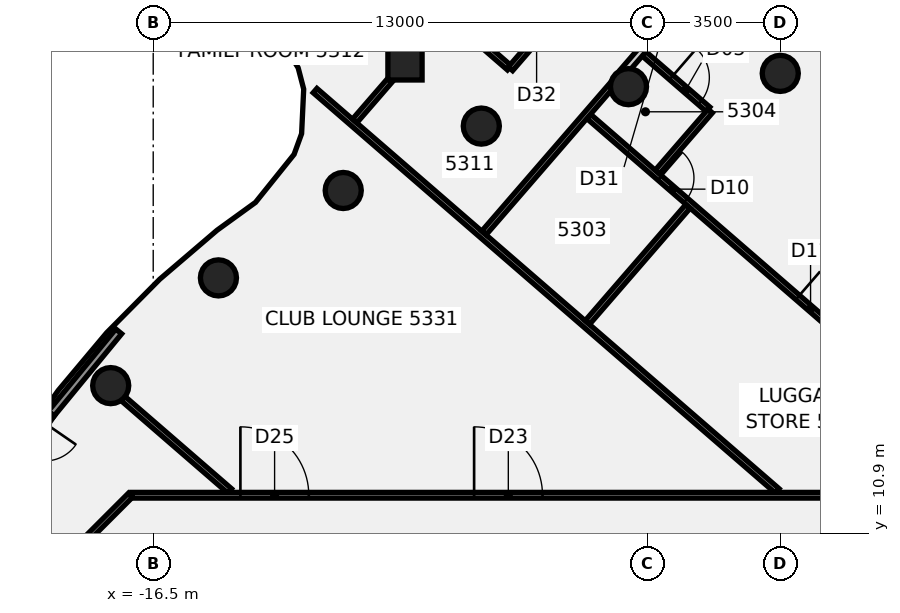
"""IFC4 building model, lengths in metres.
Left out: names, types, materials, properties, quantities, classifications, styles, units other than length and angle.
Written with IfcOpenShell. Run it as: python <this file> out.ifc"""

import sys

from ifc_helpers import new_model, si_unit, direction, frame, frame_2d, origin, origin_2d, place, context, subcontext, project, spatial, rectangle, circle, extrude, element, fill, save


model = new_model("IFC4")
c1 = context("Model", 3, precision=1e-05, world=origin(), true_north=direction((0.0, 1.0)))
c2 = subcontext(c1, "Body", "Model", "MODEL_VIEW")
j1 = project(units=[si_unit("LENGTHUNIT", "METRE"), si_unit("PLANEANGLEUNIT", "RADIAN")], contexts=[c1])
p1 = place(None, origin())
s1 = spatial("IfcSite", under=j1, at=p1, CompositionType="ELEMENT")
p2 = place(p1, origin())
s2 = spatial("IfcBuilding", under=s1, at=p2, CompositionType="ELEMENT")
p3 = place(p2, frame((0.0, 0.0, 211.3)))
s3 = spatial("IfcBuildingStorey", under=s2, at=p3, CompositionType="ELEMENT", Elevation=211.3)
for number, where, z_axis, x_axis in (
    (1, (0.0, 23.0, -0.14), (0.0, 0.0, 1.0), (1.0, 0.0, 0.0)),
    (2, (-3.994, 22.651, -0.14), (0.0, 0.0, 1.0), (1.0, 0.0, 0.0)),
    (3, (-7.866, 21.613, -0.14), (0.0, 0.0, 1.0), (1.0, 0.0, 0.0)),
    (4, (-11.5, 19.919, -0.14), (0.0, 0.0, 1.0), (1.0, 0.0, 0.0)),
    (5, (-14.784, 17.619, -0.14), (0.0, 0.0, 1.0), (1.0, 0.0, 0.0)),
    (6, (-17.619, 14.784, -0.14), (0.0, 0.0, 1.0), (1.0, 0.0, 0.0)),
):
    element("IfcColumn", number, at=place(p3, frame(where, z_axis=z_axis, x_axis=x_axis)), inside=s3, PredefinedType="COLUMN", context=c2, shape_type="SweptSolid", body=[
        extrude(circle(Radius=0.475, at=origin_2d()), origin(), (0.0, 0.0, 1.0), 3.56),
    ])
p4 = place(p3, frame((-9.875, 23.276, -0.139), z_axis=(-0.006107636485, -0.050576720108, 0.998701503033), x_axis=(0.65512033416, 0.754344619796, 0.042208320932)))
e7 = element("IfcColumn", 7, at=p4, inside=s3, PredefinedType="COLUMN", context=c2, shape_type="SweptSolid", body=[
    extrude(rectangle(XDim=0.9, YDim=0.9, at=origin_2d()), origin(), (0.0, 0.0, 1.0), 3.558),
])
p5 = place(p3, frame((-17.295, 14.446, 0.0), z_axis=(0.0, 0.0, 1.0), x_axis=(0.755890810331, -0.654697703415, 0.0)))
e8 = element("IfcWall", 8, at=p5, inside=s3, PredefinedType="PARTITIONING", context=c2, shape_type="SweptSolid", body=[
    extrude(rectangle(XDim=3.713, YDim=0.15, at=frame_2d((1.856, 0.0))), origin(), (0.0, 0.0, 1.0), 2.824),
])
p6 = place(p3, frame((-12.241, 22.547, 0.0), z_axis=(0.0, 0.0, 1.0), x_axis=(0.7559218532, -0.6546618607, 0.0)))
e9 = element("IfcWall", 9, at=p6, inside=s3, PredefinedType="PARTITIONING", context=c2, shape_type="SweptSolid", body=[
    extrude(rectangle(XDim=16.089, YDim=0.15, at=frame_2d((8.044, 0.0))), origin(), (0.0, 0.0, 1.0), 2.824),
])
p7 = place(p3, frame((-10.4, 29.421, 0.0), z_axis=(0.0, 0.0, 1.0), x_axis=(0.755729912983, -0.654883423689, 0.0)))
e10 = element("IfcWall", 10, at=p7, inside=s3, PredefinedType="PARTITIONING", context=c2, shape_type="SweptSolid", body=[
    extrude(rectangle(XDim=11.245, YDim=0.15, at=frame_2d((5.623, 0.0))), origin(), (0.0, 0.0, 1.0), 2.72),
])
p8 = place(p7, frame((9.97, 0.0, 0.0)))
e11 = element("IfcOpeningElement", 11, at=p8, cuts=e10, PredefinedType="OPENING", context=c2, shape_type="SweptSolid", body=[
    extrude(rectangle(XDim=1.0, YDim=2.1, at=frame_2d((0.5, 1.05))), frame((0.0, 0.085, 0.0), z_axis=(0.0, -1.0, 0.0), x_axis=(1.0, 0.0, 0.0)), (0.0, 0.0, 1.0), 0.17),
])
p9 = place(p7, frame((7.52, 0.0, 0.0)))
e12 = element("IfcOpeningElement", 12, at=p9, cuts=e10, PredefinedType="OPENING", context=c2, shape_type="SweptSolid", body=[
    extrude(rectangle(XDim=0.9, YDim=2.1, at=frame_2d((0.45, 1.05))), frame((0.0, 0.085, 0.0), z_axis=(0.0, -1.0, 0.0), x_axis=(1.0, 0.0, 0.0)), (0.0, 0.0, 1.0), 0.17),
])
p10 = place(p7, frame((0.82, 0.0, 0.0)))
e13 = element("IfcOpeningElement", 13, at=p10, cuts=e10, PredefinedType="OPENING", context=c2, shape_type="SweptSolid", body=[
    extrude(rectangle(XDim=0.9, YDim=2.1, at=frame_2d((0.45, 1.05))), frame((0.0, 0.085, 0.0), z_axis=(0.0, -1.0, 0.0), x_axis=(1.0, 0.0, 0.0)), (0.0, 0.0, 1.0), 0.17),
])
p11 = place(p3, frame((-10.395, 25.976, 0.0), z_axis=(0.0, 0.0, 1.0), x_axis=(0.755739421536, -0.654872450739, 0.0)))
e14 = element("IfcWall", 14, at=p11, inside=s3, PredefinedType="PARTITIONING", context=c2, shape_type="SweptSolid", body=[
    extrude(rectangle(XDim=4.321, YDim=0.15, at=frame_2d((2.16, 0.0))), origin(), (0.0, 0.0, 1.0), 2.824),
])
p12 = place(p3, frame((-5.038, 21.865, 0.0), z_axis=(0.0, 0.0, 1.0), x_axis=(0.755861973067, -0.654730996419, 0.0)))
e15 = element("IfcWall", 15, at=p12, inside=s3, PredefinedType="PARTITIONING", context=c2, shape_type="SweptSolid", body=[
    extrude(rectangle(XDim=15.047, YDim=0.15, at=frame_2d((7.523, 0.0))), origin(), (0.0, 0.0, 1.0), 2.72),
])
p13 = place(p12, frame((2.47, 0.0, 0.0)))
e16 = element("IfcOpeningElement", 16, at=p13, cuts=e15, PredefinedType="OPENING", context=c2, shape_type="SweptSolid", body=[
    extrude(rectangle(XDim=0.9, YDim=2.1, at=frame_2d((0.45, 1.05))), frame((0.0, 0.085, 0.0), z_axis=(0.0, -1.0, 0.0), x_axis=(1.0, 0.0, 0.0)), (0.0, 0.0, 1.0), 0.17),
])
p14 = place(p12, frame((7.27, 0.0, 0.0)))
e17 = element("IfcOpeningElement", 17, at=p14, cuts=e15, PredefinedType="OPENING", context=c2, shape_type="SweptSolid", body=[
    extrude(rectangle(XDim=0.9, YDim=2.1, at=frame_2d((0.45, 1.05))), frame((0.0, 0.085, 0.0), z_axis=(0.0, -1.0, 0.0), x_axis=(1.0, 0.0, 0.0)), (0.0, 0.0, 1.0), 0.17),
])
p15 = place(p3, frame((-0.556, 26.979, 0.0), z_axis=(0.0, 0.0, 1.0), x_axis=(0.75610536707, -0.654449901741, 0.0)))
e18 = element("IfcWall", 18, at=p15, inside=s3, PredefinedType="PARTITIONING", context=c2, shape_type="SweptSolid", body=[
    extrude(rectangle(XDim=6.054, YDim=0.15, at=frame_2d((3.027, 0.0))), origin(), (0.0, 0.0, 1.0), 2.824),
])
p16 = place(p15, frame((2.43, 0.0, 0.0)))
e19 = element("IfcOpeningElement", 19, at=p16, cuts=e18, PredefinedType="OPENING", context=c2, shape_type="SweptSolid", body=[
    extrude(rectangle(XDim=0.9, YDim=2.1, at=frame_2d((0.45, 1.05))), frame((0.0, 0.085, 0.0), z_axis=(0.0, -1.0, 0.0), x_axis=(1.0, 0.0, 0.0)), (0.0, 0.0, 1.0), 0.17),
])
p17 = place(p3, frame((-17.065, 11.9, 0.0), z_axis=(0.0, 0.0, 1.0), x_axis=(1.0, 0.0, 0.0)))
e20 = element("IfcWall", 20, at=p17, inside=s3, PredefinedType="PARTITIONING", context=c2, shape_type="SweptSolid", body=[
    extrude(rectangle(XDim=34.165, YDim=0.15, at=frame_2d((17.083, 0.0))), origin(), (0.0, 0.0, 1.0), 2.824),
])
p18 = place(p17, frame((24.284, 0.0, 0.0)))
e21 = element("IfcOpeningElement", 21, at=p18, cuts=e20, PredefinedType="OPENING", context=c2, shape_type="SweptSolid", body=[
    extrude(rectangle(XDim=1.8, YDim=2.1, at=frame_2d((0.9, 1.05))), frame((0.0, 0.085, 0.0), z_axis=(0.0, -1.0, 0.0), x_axis=(1.0, 0.0, 0.0)), (0.0, 0.0, 1.0), 0.17),
])
p19 = place(p17, frame((9.009, 0.0, 0.0)))
e22 = element("IfcOpeningElement", 22, at=p19, cuts=e20, PredefinedType="OPENING", context=c2, shape_type="SweptSolid", body=[
    extrude(rectangle(XDim=1.8, YDim=2.1, at=frame_2d((0.9, 1.05))), frame((0.0, 0.085, 0.0), z_axis=(0.0, -1.0, 0.0), x_axis=(1.0, 0.0, 0.0)), (0.0, 0.0, 1.0), 0.17),
])
p20 = place(p17, frame((29.321, 0.0, 0.0)))
e23 = element("IfcOpeningElement", 23, at=p20, cuts=e20, PredefinedType="OPENING", context=c2, shape_type="SweptSolid", body=[
    extrude(rectangle(XDim=0.9, YDim=2.1, at=frame_2d((0.45, 1.05))), frame((0.0, 0.085, 0.0), z_axis=(0.0, -1.0, 0.0), x_axis=(1.0, 0.0, 0.0)), (0.0, 0.0, 1.0), 0.17),
])
p21 = place(p17, frame((2.859, 0.0, 0.0)))
e24 = element("IfcOpeningElement", 24, at=p21, cuts=e20, PredefinedType="OPENING", context=c2, shape_type="SweptSolid", body=[
    extrude(rectangle(XDim=1.8, YDim=2.1, at=frame_2d((0.9, 1.05))), frame((0.0, 0.085, 0.0), z_axis=(0.0, -1.0, 0.0), x_axis=(1.0, 0.0, 0.0)), (0.0, 0.0, 1.0), 0.17),
])
p22 = place(p3, frame((-18.872, 10.128, 0.0), z_axis=(0.0, 0.0, 1.0), x_axis=(0.707106781187, 0.707106781187, 0.0)))
e25 = element("IfcWall", 25, at=p22, inside=s3, PredefinedType="PARTITIONING", context=c2, shape_type="SweptSolid", body=[
    extrude(rectangle(XDim=2.505, YDim=0.15, at=frame_2d((1.253, 0.0))), origin(), (0.0, 0.0, 1.0), 2.824),
])
p23 = place(p3, frame((-11.198, 21.75, 0.0), z_axis=(0.0, 0.0, 1.0), x_axis=(0.654772960392, 0.755825621648, 0.0)))
e26 = element("IfcWall", 26, at=p23, inside=s3, PredefinedType="PARTITIONING", context=c2, shape_type="SweptSolid", body=[
    extrude(rectangle(XDim=1.416, YDim=0.15, at=frame_2d((0.708, 0.0))), origin(), (0.0, 0.0, 1.0), 2.824),
])
p24 = place(p3, frame((-7.796, 18.803, 0.0), z_axis=(0.0, 0.0, 1.0), x_axis=(0.654718163519, 0.755873088791, 0.0)))
e27 = element("IfcWall", 27, at=p24, inside=s3, PredefinedType="PARTITIONING", context=c2, shape_type="SweptSolid", body=[
    extrude(rectangle(XDim=5.165, YDim=0.15, at=frame_2d((2.583, 0.0))), origin(), (0.0, 0.0, 1.0), 2.72),
])
p25 = place(p3, frame((-4.119, 23.048, 0.0), z_axis=(0.0, 0.0, 1.0), x_axis=(0.654685276968, 0.755901573038, 0.0)))
e28 = element("IfcWall", 28, at=p25, inside=s3, PredefinedType="PARTITIONING", context=c2, shape_type="SweptSolid", body=[
    extrude(rectangle(XDim=8.604, YDim=0.2, at=frame_2d((4.302, 0.0))), origin(), (0.0, 0.0, 1.0), 2.82),
])
p26 = place(p25, frame((1.005, 0.0, 0.0)))
e29 = element("IfcOpeningElement", 29, at=p26, cuts=e28, PredefinedType="OPENING", context=c2, shape_type="SweptSolid", body=[
    extrude(rectangle(XDim=1.4, YDim=2.1, at=frame_2d((0.7, 1.05))), frame((0.0, 0.11, 0.0), z_axis=(0.0, -1.0, 0.0), x_axis=(1.0, 0.0, 0.0)), (0.0, 0.0, 1.0), 0.22),
])
p27 = place(p3, frame((-7.099, 23.121, 0.0), z_axis=(0.0, 0.0, 1.0), x_axis=(0.654764510889, 0.755832941384, 0.0)))
e30 = element("IfcWall", 30, at=p27, inside=s3, PredefinedType="PARTITIONING", context=c2, shape_type="SweptSolid", body=[
    extrude(rectangle(XDim=2.52, YDim=0.15, at=frame_2d((1.26, 0.0))), origin(), (0.0, 0.0, 1.0), 2.82),
])
p28 = place(p27, frame((0.6, 0.0, 0.0)))
e31 = element("IfcOpeningElement", 31, at=p28, cuts=e30, PredefinedType="OPENING", context=c2, shape_type="SweptSolid", body=[
    extrude(rectangle(XDim=0.9, YDim=2.1, at=frame_2d((0.45, 1.05))), frame((0.0, 0.085, 0.0), z_axis=(0.0, -1.0, 0.0), x_axis=(1.0, 0.0, 0.0)), (0.0, 0.0, 1.0), 0.17),
])
p29 = place(p3, frame((-5.075, 16.447, 0.0), z_axis=(0.0, 0.0, 1.0), x_axis=(0.654718867346, 0.755872479153, 0.0)))
e32 = element("IfcWall", 32, at=p29, inside=s3, PredefinedType="PARTITIONING", context=c2, shape_type="SweptSolid", body=[
    extrude(rectangle(XDim=4.04, YDim=0.15, at=frame_2d((2.02, 0.0))), origin(), (0.0, 0.0, 1.0), 2.824),
])
p30 = place(p3, frame((-3.232, 20.407, 0.0), z_axis=(0.0, 0.0, 1.0), x_axis=(0.654842812105, 0.755765103345, 0.0)))
e33 = element("IfcWall", 33, at=p30, inside=s3, PredefinedType="PARTITIONING", context=c2, shape_type="SweptSolid", body=[
    extrude(rectangle(XDim=2.119, YDim=0.15, at=frame_2d((1.06, 0.0))), origin(), (0.0, 0.0, 1.0), 2.824),
])
p31 = place(p3, frame((-17.408, 16.211, 0.0), z_axis=(0.0, 0.0, 1.0), x_axis=(-0.634912325122, -0.772584195676, 0.0)))
e34 = element("IfcWall", 34, at=p31, inside=s3, PredefinedType="SOLIDWALL", context=c2, shape_type="SweptSolid", body=[
    extrude(rectangle(XDim=2.8, YDim=0.2, at=frame_2d((1.4, 0.0))), origin(), (0.0, 0.0, 1.0), 3.42),
])
p32 = place(p3, frame((-19.186, 14.047, 0.0), z_axis=(0.0, 0.0, 1.0), x_axis=(-0.567772198578, -0.823185720552, 0.0)))
e35 = element("IfcWall", 35, at=p32, inside=s3, PredefinedType="SOLIDWALL", context=c2, shape_type="SweptSolid", body=[
    extrude(rectangle(XDim=1.599, YDim=0.2, at=frame_2d((0.8, 0.0))), origin(), (0.0, 0.0, 1.0), 3.42),
])
p33 = place(p32, frame((0.3, 0.0, 0.0)))
e36 = element("IfcOpeningElement", 36, at=p33, cuts=e35, PredefinedType="OPENING", context=c2, shape_type="SweptSolid", body=[
    extrude(rectangle(XDim=1.0, YDim=2.4, at=frame_2d((0.5, 1.2))), frame((0.0, 0.11, 0.0), z_axis=(0.0, -1.0, 0.0), x_axis=(1.0, 0.0, 0.0)), (0.0, 0.0, 1.0), 0.22),
])
p34 = place(p8, frame((1.0, 0.0, 0.0), z_axis=(0.0, 0.0, 1.0), x_axis=(-1.0, 0.0, 0.0)))
e37 = element("IfcDoor", 37, at=p34, inside=s3, OperationType="SINGLE_SWING_RIGHT", PredefinedType="DOOR", context=c2, shape_type="SweptSolid", body=[
    extrude(rectangle(XDim=1.0, YDim=2.1, at=frame_2d((0.5, 1.05))), frame((0.0, 0.025, 0.0), z_axis=(0.0, -1.0, 0.0), x_axis=(1.0, 0.0, 0.0)), (0.0, 0.0, 1.0), 0.05),
])
fill(e11, e37)
p35 = place(p13, frame((0.9, 0.0, 0.0), z_axis=(0.0, 0.0, 1.0), x_axis=(-1.0, 0.0, 0.0)))
e38 = element("IfcDoor", 38, at=p35, inside=s3, OperationType="SINGLE_SWING_LEFT", PredefinedType="DOOR", context=c2, shape_type="SweptSolid", body=[
    extrude(rectangle(XDim=0.9, YDim=2.1, at=frame_2d((0.45, 1.05))), frame((0.0, 0.025, 0.0), z_axis=(0.0, -1.0, 0.0), x_axis=(1.0, 0.0, 0.0)), (0.0, 0.0, 1.0), 0.05),
])
fill(e16, e38)
p36 = place(p14, frame((0.9, 0.0, 0.0), z_axis=(0.0, 0.0, 1.0), x_axis=(-1.0, 0.0, 0.0)))
e39 = element("IfcDoor", 39, at=p36, inside=s3, OperationType="SINGLE_SWING_RIGHT", PredefinedType="DOOR", context=c2, shape_type="SweptSolid", body=[
    extrude(rectangle(XDim=0.9, YDim=2.1, at=frame_2d((0.45, 1.05))), frame((0.0, 0.025, 0.0), z_axis=(0.0, -1.0, 0.0), x_axis=(1.0, 0.0, 0.0)), (0.0, 0.0, 1.0), 0.05),
])
fill(e17, e39)
p37 = place(p19, origin())
e40 = element("IfcDoor", 40, at=p37, inside=s3, OperationType="DOUBLE_DOOR_SINGLE_SWING", PredefinedType="DOOR", context=c2, shape_type="SweptSolid", body=[
    extrude(rectangle(XDim=1.8, YDim=2.1, at=frame_2d((0.9, 1.05))), frame((0.0, 0.025, 0.0), z_axis=(0.0, -1.0, 0.0), x_axis=(1.0, 0.0, 0.0)), (0.0, 0.0, 1.0), 0.05),
])
fill(e22, e40)
p38 = place(p21, origin())
e41 = element("IfcDoor", 41, at=p38, inside=s3, OperationType="DOUBLE_DOOR_SINGLE_SWING", PredefinedType="DOOR", context=c2, shape_type="SweptSolid", body=[
    extrude(rectangle(XDim=1.8, YDim=2.1, at=frame_2d((0.9, 1.05))), frame((0.0, 0.025, 0.0), z_axis=(0.0, -1.0, 0.0), x_axis=(1.0, 0.0, 0.0)), (0.0, 0.0, 1.0), 0.05),
])
fill(e24, e41)
save(model, sys.argv[1])
